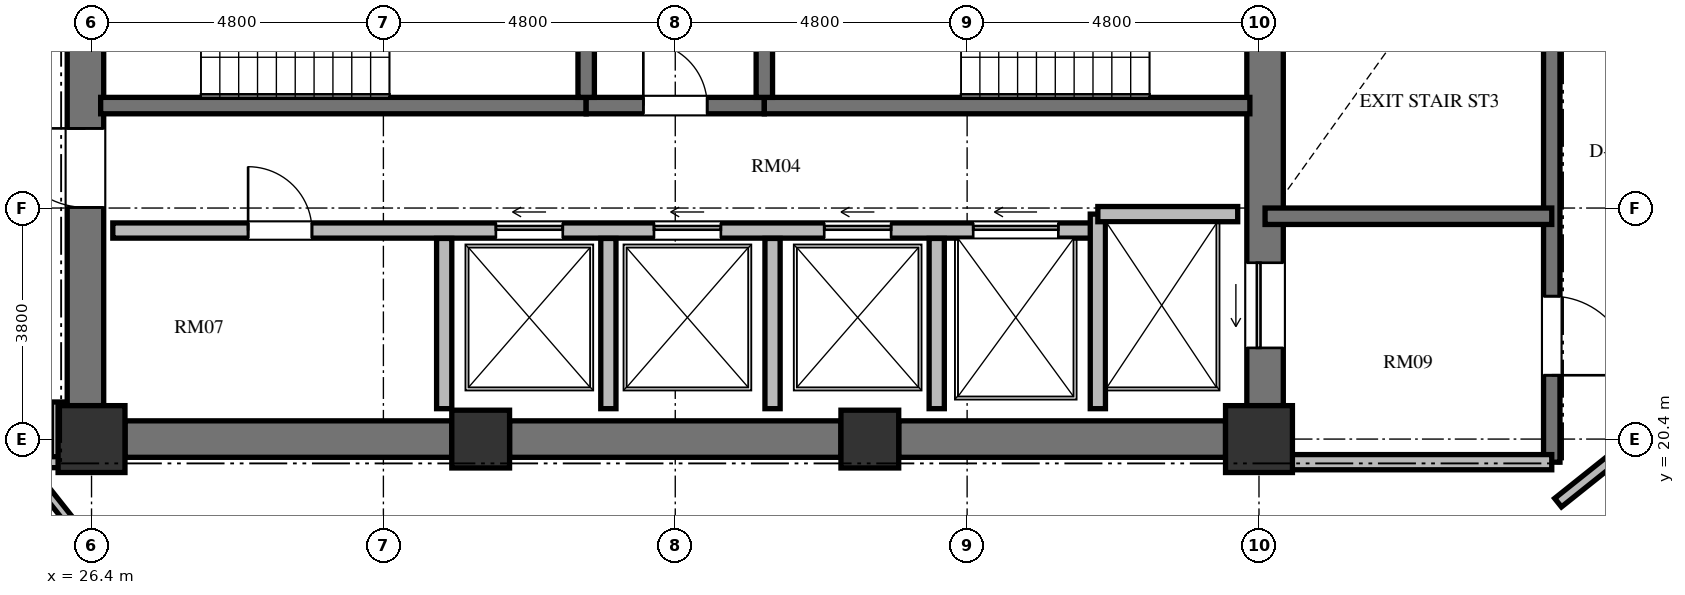
"""IFC4 building model, lengths in metres.
Left out: names, types, materials, properties, quantities, classifications, styles, units other than length and angle.
Written with IfcOpenShell. Run it as: python <this file> out.ifc"""

import sys

from ifc_helpers import new_model, si_unit, direction, frame, frame_2d, origin, origin_2d, place, context, subcontext, project, spatial, rectangle, extrude, element, fill, save


model = new_model("IFC4")
c1 = context("Model", 3, precision=1e-05, world=origin(), true_north=direction((0.0, 1.0)))
c2 = subcontext(c1, "Body", "Model", "MODEL_VIEW")
j1 = project(units=[si_unit("LENGTHUNIT", "METRE"), si_unit("PLANEANGLEUNIT", "RADIAN")], contexts=[c1])
p1 = place(None, origin())
s1 = spatial("IfcSite", under=j1, at=p1, CompositionType="ELEMENT")
p2 = place(p1, origin())
s2 = spatial("IfcBuilding", under=s1, at=p2, CompositionType="ELEMENT")
p3 = place(p2, frame((0.0, 0.0, 152.88)))
s3 = spatial("IfcBuildingStorey", under=s2, at=p3, CompositionType="ELEMENT", Elevation=152.88)
p4 = place(p3, frame((26.4, 20.4, 0.0), z_axis=(0.0, 0.0, 1.0), x_axis=(1.0, 0.0, 0.0)))
e1 = element("IfcColumn", 1, at=p4, inside=s3, PredefinedType="COLUMN", context=c2, shape_type="SweptSolid", body=[
    extrude(rectangle(XDim=1.1, YDim=1.1, at=origin_2d()), origin(), (0.0, 0.0, 1.0), 3.648),
])
for number, where, z_axis, x_axis in (
    (2, (32.8, 20.4, 0.0), (0.0, 0.0, 1.0), (1.0, 0.0, 0.0)),
    (3, (39.2, 20.4, 0.0), (0.0, 0.0, 1.0), (1.0, 0.0, 0.0)),
):
    element("IfcColumn", number, at=place(p3, frame(where, z_axis=z_axis, x_axis=x_axis)), inside=s3, PredefinedType="COLUMN", context=c2, shape_type="SweptSolid", body=[
        extrude(rectangle(XDim=0.95, YDim=0.95, at=origin_2d()), origin(), (0.0, 0.0, 1.0), 3.648),
    ])
p5 = place(p3, frame((45.6, 20.4, 0.0), z_axis=(0.0, 0.0, 1.0), x_axis=(1.0, 0.0, 0.0)))
e4 = element("IfcColumn", 4, at=p5, inside=s3, PredefinedType="COLUMN", context=c2, shape_type="SweptSolid", body=[
    extrude(rectangle(XDim=1.1, YDim=1.1, at=origin_2d()), origin(), (0.0, 0.0, 1.0), 3.648),
])
p6 = place(p3, frame((26.3, 20.95, 0.0), z_axis=(0.0, 0.0, 1.0), x_axis=(0.0, 1.0, 0.0)))
e5 = element("IfcWall", 5, at=p6, inside=s3, PredefinedType="SHEAR", context=c2, shape_type="SweptSolid", body=[
    extrude(rectangle(XDim=14.1, YDim=0.6, at=frame_2d((7.05, 0.0))), origin(), (0.0, 0.0, 1.0), 3.648),
])
p7 = place(p6, frame((6.5, 0.0, 0.0)))
e6 = element("IfcOpeningElement", 6, at=p7, cuts=e5, PredefinedType="OPENING", context=c2, shape_type="SweptSolid", body=[
    extrude(rectangle(XDim=1.2, YDim=2.15, at=frame_2d((0.6, 1.075))), frame((0.0, 0.31, 0.0), z_axis=(0.0, -1.0, 0.0), x_axis=(1.0, 0.0, 0.0)), (0.0, 0.0, 1.0), 0.62),
])
p8 = place(p6, frame((9.6, 0.0, 0.0)))
e7 = element("IfcOpeningElement", 7, at=p8, cuts=e5, PredefinedType="OPENING", context=c2, shape_type="SweptSolid", body=[
    extrude(rectangle(XDim=1.3, YDim=2.2, at=frame_2d((0.65, 1.1))), frame((0.0, 0.31, 0.0), z_axis=(0.0, -1.0, 0.0), x_axis=(1.0, 0.0, 0.0)), (0.0, 0.0, 1.0), 0.62),
])
p9 = place(p6, frame((3.26, 0.0, 0.0)))
e8 = element("IfcOpeningElement", 8, at=p9, cuts=e5, PredefinedType="OPENING", context=c2, shape_type="SweptSolid", body=[
    extrude(rectangle(XDim=1.3, YDim=2.2, at=frame_2d((0.65, 1.1))), frame((0.0, 0.31, 0.0), z_axis=(0.0, -1.0, 0.0), x_axis=(1.0, 0.0, 0.0)), (0.0, 0.0, 1.0), 0.62),
])
p10 = place(p3, frame((45.7, 20.95, 0.0), z_axis=(0.0, 0.0, 1.0), x_axis=(0.0, 1.0, 0.0)))
e9 = element("IfcWall", 9, at=p10, inside=s3, PredefinedType="SHEAR", context=c2, shape_type="SweptSolid", body=[
    extrude(rectangle(XDim=14.1, YDim=0.6, at=frame_2d((7.05, 0.0))), origin(), (0.0, 0.0, 1.0), 3.648),
])
p11 = place(p10, frame((11.75, 0.0, 0.0)))
e10 = element("IfcOpeningElement", 10, at=p11, cuts=e9, PredefinedType="OPENING", context=c2, shape_type="SweptSolid", body=[
    extrude(rectangle(XDim=1.4, YDim=2.3, at=frame_2d((0.7, 1.15))), frame((0.0, 0.31, 0.0), z_axis=(0.0, -1.0, 0.0), x_axis=(1.0, 0.0, 0.0)), (0.0, 0.0, 1.0), 0.62),
])
p12 = place(p10, frame((0.95, 0.0, 0.0)))
e11 = element("IfcOpeningElement", 11, at=p12, cuts=e9, PredefinedType="OPENING", context=c2, shape_type="SweptSolid", body=[
    extrude(rectangle(XDim=1.4, YDim=2.3, at=frame_2d((0.7, 1.15))), frame((0.0, 0.31, 0.0), z_axis=(0.0, -1.0, 0.0), x_axis=(1.0, 0.0, 0.0)), (0.0, 0.0, 1.0), 0.62),
])
p13 = place(p3, frame((26.95, 20.4, 0.0), z_axis=(0.0, 0.0, 1.0), x_axis=(1.0, 0.0, 0.0)))
e12 = element("IfcWall", 12, at=p13, inside=s3, PredefinedType="SHEAR", context=c2, shape_type="SweptSolid", body=[
    extrude(rectangle(XDim=5.375, YDim=0.6, at=frame_2d((2.688, 0.0))), origin(), (0.0, 0.0, 1.0), 3.648),
])
p14 = place(p3, frame((33.275, 20.4, 0.0), z_axis=(0.0, 0.0, 1.0), x_axis=(1.0, 0.0, 0.0)))
e13 = element("IfcWall", 13, at=p14, inside=s3, PredefinedType="SHEAR", context=c2, shape_type="SweptSolid", body=[
    extrude(rectangle(XDim=5.45, YDim=0.6, at=frame_2d((2.725, 0.0))), origin(), (0.0, 0.0, 1.0), 3.648),
])
p15 = place(p3, frame((39.675, 20.4, 0.0), z_axis=(0.0, 0.0, 1.0), x_axis=(1.0, 0.0, 0.0)))
e14 = element("IfcWall", 14, at=p15, inside=s3, PredefinedType="SHEAR", context=c2, shape_type="SweptSolid", body=[
    extrude(rectangle(XDim=5.375, YDim=0.6, at=frame_2d((2.688, 0.0))), origin(), (0.0, 0.0, 1.0), 3.648),
])
p16 = place(p3, frame((26.55, 25.885, 0.0), z_axis=(0.0, 0.0, 1.0), x_axis=(1.0, 0.0, 0.0)))
e15 = element("IfcWall", 15, at=p16, inside=s3, PredefinedType="SHEAR", context=c2, shape_type="SweptSolid", body=[
    extrude(rectangle(XDim=7.985, YDim=0.27, at=frame_2d((3.992, 0.0))), origin(), (0.0, 0.0, 1.0), 3.648),
])
p17 = place(p3, frame((34.535, 25.885, 0.0), z_axis=(0.0, 0.0, 1.0), x_axis=(1.0, 0.0, 0.0)))
e16 = element("IfcWall", 16, at=p17, inside=s3, PredefinedType="SHEAR", context=c2, shape_type="SweptSolid", body=[
    extrude(rectangle(XDim=2.93, YDim=0.27, at=frame_2d((1.465, 0.0))), origin(), (0.0, 0.0, 1.0), 3.648),
])
p18 = place(p17, frame((0.94, 0.0, 0.0)))
e17 = element("IfcOpeningElement", 17, at=p18, cuts=e16, PredefinedType="OPENING", context=c2, shape_type="SweptSolid", body=[
    extrude(rectangle(XDim=1.05, YDim=2.15, at=frame_2d((0.525, 1.075))), frame((0.0, 0.145, 0.0), z_axis=(0.0, -1.0, 0.0), x_axis=(1.0, 0.0, 0.0)), (0.0, 0.0, 1.0), 0.29),
])
p19 = place(p3, frame((37.465, 25.885, 0.0), z_axis=(0.0, 0.0, 1.0), x_axis=(1.0, 0.0, 0.0)))
e18 = element("IfcWall", 18, at=p19, inside=s3, PredefinedType="SHEAR", context=c2, shape_type="SweptSolid", body=[
    extrude(rectangle(XDim=7.985, YDim=0.27, at=frame_2d((3.992, 0.0))), origin(), (0.0, 0.0, 1.0), 3.648),
])
for number, where, z_axis, x_axis in (
    (19, (34.535, 26.02, 0.0), (0.0, 0.0, 1.0), (0.0, 1.0, 0.0)),
    (20, (37.465, 26.02, 0.0), (0.0, 0.0, 1.0), (0.0, 1.0, 0.0)),
):
    element("IfcWall", number, at=place(p3, frame(where, z_axis=z_axis, x_axis=x_axis)), inside=s3, PredefinedType="SHEAR", context=c2, shape_type="SweptSolid", body=[
        extrude(rectangle(XDim=4.08, YDim=0.27, at=frame_2d((2.04, 0.0))), origin(), (0.0, 0.0, 1.0), 3.648),
    ])
p20 = place(p3, frame((26.75, 23.83, 0.0), z_axis=(0.0, 0.0, 1.0), x_axis=(1.0, 0.0, 0.0)))
e21 = element("IfcWall", 21, at=p20, inside=s3, PredefinedType="SOLIDWALL", context=c2, shape_type="SweptSolid", body=[
    extrude(rectangle(XDim=16.2, YDim=0.25, at=frame_2d((8.1, 0.0))), origin(), (0.0, 0.0, 1.0), 3.428),
])
p21 = place(p20, frame((2.225, 0.0, 0.0)))
e22 = element("IfcOpeningElement", 22, at=p21, cuts=e21, PredefinedType="OPENING", context=c2, shape_type="SweptSolid", body=[
    extrude(rectangle(XDim=1.05, YDim=2.15, at=frame_2d((0.525, 1.075))), frame((0.0, 0.135, 0.0), z_axis=(0.0, -1.0, 0.0), x_axis=(1.0, 0.0, 0.0)), (0.0, 0.0, 1.0), 0.27),
])
p22 = place(p20, frame((6.3, 0.0, 0.0)))
e23 = element("IfcOpeningElement", 23, at=p22, cuts=e21, PredefinedType="OPENING", context=c2, shape_type="SweptSolid", body=[
    extrude(rectangle(XDim=1.1, YDim=2.2, at=frame_2d((0.55, 1.1))), frame((0.0, 0.135, 0.0), z_axis=(0.0, -1.0, 0.0), x_axis=(1.0, 0.0, 0.0)), (0.0, 0.0, 1.0), 0.27),
])
p23 = place(p20, frame((8.9, 0.0, 0.0)))
e24 = element("IfcOpeningElement", 24, at=p23, cuts=e21, PredefinedType="OPENING", context=c2, shape_type="SweptSolid", body=[
    extrude(rectangle(XDim=1.1, YDim=2.2, at=frame_2d((0.55, 1.1))), frame((0.0, 0.135, 0.0), z_axis=(0.0, -1.0, 0.0), x_axis=(1.0, 0.0, 0.0)), (0.0, 0.0, 1.0), 0.27),
])
p24 = place(p20, frame((11.7, 0.0, 0.0)))
e25 = element("IfcOpeningElement", 25, at=p24, cuts=e21, PredefinedType="OPENING", context=c2, shape_type="SweptSolid", body=[
    extrude(rectangle(XDim=1.1, YDim=2.2, at=frame_2d((0.55, 1.1))), frame((0.0, 0.135, 0.0), z_axis=(0.0, -1.0, 0.0), x_axis=(1.0, 0.0, 0.0)), (0.0, 0.0, 1.0), 0.27),
])
p25 = place(p20, frame((14.15, 0.0, 0.0)))
e26 = element("IfcOpeningElement", 26, at=p25, cuts=e21, PredefinedType="OPENING", context=c2, shape_type="SweptSolid", body=[
    extrude(rectangle(XDim=1.4, YDim=2.3, at=frame_2d((0.7, 1.15))), frame((0.0, 0.135, 0.0), z_axis=(0.0, -1.0, 0.0), x_axis=(1.0, 0.0, 0.0)), (0.0, 0.0, 1.0), 0.27),
])
p26 = place(p3, frame((42.95, 20.9, 0.0), z_axis=(0.0, 0.0, 1.0), x_axis=(0.0, 1.0, 0.0)))
e27 = element("IfcWall", 27, at=p26, inside=s3, PredefinedType="SOLIDWALL", context=c2, shape_type="SweptSolid", body=[
    extrude(rectangle(XDim=3.2, YDim=0.25, at=frame_2d((1.6, 0.0))), origin(), (0.0, 0.0, 1.0), 3.428),
])
p27 = place(p3, frame((42.95, 24.1, 0.0), z_axis=(0.0, 0.0, 1.0), x_axis=(1.0, 0.0, 0.0)))
e28 = element("IfcWall", 28, at=p27, inside=s3, PredefinedType="SOLIDWALL", context=c2, shape_type="SweptSolid", body=[
    extrude(rectangle(XDim=2.3, YDim=0.25, at=frame_2d((1.15, 0.0))), origin(), (0.0, 0.0, 1.0), 3.428),
])
for number, where, z_axis, x_axis in (
    (29, (32.2, 20.9, 0.0), (0.0, 0.0, 1.0), (0.0, 1.0, 0.0)),
    (30, (34.9, 20.9, 0.0), (0.0, 0.0, 1.0), (0.0, 1.0, 0.0)),
    (31, (37.6, 20.9, 0.0), (0.0, 0.0, 1.0), (0.0, 1.0, 0.0)),
    (32, (40.3, 20.9, 0.0), (0.0, 0.0, 1.0), (0.0, 1.0, 0.0)),
):
    element("IfcWall", number, at=place(p3, frame(where, z_axis=z_axis, x_axis=x_axis)), inside=s3, PredefinedType="SOLIDWALL", context=c2, shape_type="SweptSolid", body=[
        extrude(rectangle(XDim=2.8, YDim=0.25, at=frame_2d((1.4, 0.0))), origin(), (0.0, 0.0, 1.0), 3.428),
    ])
p28 = place(p3, frame((50.415, 35.845, 0.0), z_axis=(0.0, 0.0, 1.0), x_axis=(0.0, -1.0, 0.0)))
e33 = element("IfcWall", 33, at=p28, inside=s3, PredefinedType="SHEAR", context=c2, shape_type="SweptSolid", body=[
    extrude(rectangle(XDim=15.825, YDim=0.27, at=frame_2d((7.913, 0.0))), origin(), (0.0, 0.0, 1.0), 3.648),
])
p29 = place(p28, frame((4.445, 0.0, 0.0)))
e34 = element("IfcOpeningElement", 34, at=p29, cuts=e33, PredefinedType="OPENING", context=c2, shape_type="SweptSolid", body=[
    extrude(rectangle(XDim=1.2, YDim=2.15, at=frame_2d((0.6, 1.075))), frame((0.0, 0.145, 0.0), z_axis=(0.0, -1.0, 0.0), x_axis=(1.0, 0.0, 0.0)), (0.0, 0.0, 1.0), 0.29),
])
p30 = place(p28, frame((1.295, 0.0, 0.0)))
e35 = element("IfcOpeningElement", 35, at=p30, cuts=e33, PredefinedType="OPENING", context=c2, shape_type="SweptSolid", body=[
    extrude(rectangle(XDim=1.3, YDim=2.2, at=frame_2d((0.65, 1.1))), frame((0.0, 0.145, 0.0), z_axis=(0.0, -1.0, 0.0), x_axis=(1.0, 0.0, 0.0)), (0.0, 0.0, 1.0), 0.29),
])
p31 = place(p28, frame((13.095, 0.0, 0.0)))
e36 = element("IfcOpeningElement", 36, at=p31, cuts=e33, PredefinedType="OPENING", context=c2, shape_type="SweptSolid", body=[
    extrude(rectangle(XDim=1.3, YDim=2.2, at=frame_2d((0.65, 1.1))), frame((0.0, 0.145, 0.0), z_axis=(0.0, -1.0, 0.0), x_axis=(1.0, 0.0, 0.0)), (0.0, 0.0, 1.0), 0.29),
])
p32 = place(p3, frame((45.7, 24.065, 0.0), z_axis=(0.0, 0.0, 1.0), x_axis=(1.0, 0.0, 0.0)))
e37 = element("IfcWall", 37, at=p32, inside=s3, PredefinedType="SHEAR", context=c2, shape_type="SweptSolid", body=[
    extrude(rectangle(XDim=4.715, YDim=0.27, at=frame_2d((2.357, 0.0))), origin(), (0.0, 0.0, 1.0), 3.648),
])
p33 = place(p3, frame((45.7, 20.02, 0.0), z_axis=(0.0, 0.0, 1.0), x_axis=(1.0, 0.0, 0.0)))
e38 = element("IfcWall", 38, at=p33, inside=s3, PredefinedType="SOLIDWALL", context=c2, shape_type="SweptSolid", body=[
    extrude(rectangle(XDim=4.715, YDim=0.25, at=frame_2d((2.357, 0.0))), origin(), (0.0, 0.0, 1.0), 3.428),
])
p34 = place(p3, frame((53.181, 21.481, 0.0), z_axis=(0.0, 0.0, 1.0), x_axis=(-0.781420737726, -0.624004511724, 0.0)))
e39 = element("IfcWall", 39, at=p34, inside=s3, PredefinedType="PARTITIONING", context=c2, shape_type="SweptSolid", body=[
    extrude(rectangle(XDim=3.407, YDim=0.18, at=frame_2d((1.704, 0.0))), origin(), (0.0, 0.0, 1.0), 3.428),
])
p35 = place(p3, frame((25.83, 21.01, 0.0), z_axis=(0.0, 0.0, 1.0), x_axis=(0.0, -1.0, 0.0)))
e40 = element("IfcWall", 40, at=p35, inside=s3, PredefinedType="PARTITIONING", context=c2, shape_type="SweptSolid", body=[
    extrude(rectangle(XDim=1.03, YDim=0.18, at=frame_2d((0.515, 0.0))), origin(), (0.0, 0.0, 1.0), 3.428),
])
p36 = place(p3, frame((25.87, 20.02, 0.0), z_axis=(0.0, 0.0, 1.0), x_axis=(-1.0, 0.0, 0.0)))
e41 = element("IfcWall", 41, at=p36, inside=s3, PredefinedType="PARTITIONING", context=c2, shape_type="SweptSolid", body=[
    extrude(rectangle(XDim=2.56, YDim=0.18, at=frame_2d((1.28, 0.0))), origin(), (0.0, 0.0, 1.0), 3.428),
])
p37 = place(p36, frame((0.858, 0.0, 0.0)))
e42 = element("IfcOpeningElement", 42, at=p37, cuts=e41, PredefinedType="OPENING", context=c2, shape_type="SweptSolid", body=[
    extrude(rectangle(XDim=1.05, YDim=2.15, at=frame_2d((0.525, 1.075))), frame((0.0, 0.1, 0.0), z_axis=(0.0, -1.0, 0.0), x_axis=(1.0, 0.0, 0.0)), (0.0, 0.0, 1.0), 0.2),
])
p38 = place(p3, frame((25.372, 19.898, 0.0), z_axis=(0.0, 0.0, 1.0), x_axis=(0.620699148788, -0.784048829279, 0.0)))
e43 = element("IfcWall", 43, at=p38, inside=s3, PredefinedType="PARTITIONING", context=c2, shape_type="SweptSolid", body=[
    extrude(rectangle(XDim=14.828, YDim=0.15, at=frame_2d((7.414, 0.0))), origin(), (0.0, 0.0, 1.0), 3.428),
])
p39 = place(p18, origin())
e44 = element("IfcDoor", 44, at=p39, inside=s3, OperationType="SINGLE_SWING_LEFT", PredefinedType="DOOR", context=c2, shape_type="SweptSolid", body=[
    extrude(rectangle(XDim=1.05, YDim=2.15, at=frame_2d((0.525, 1.075))), frame((0.0, 0.025, 0.0), z_axis=(0.0, -1.0, 0.0), x_axis=(1.0, 0.0, 0.0)), (0.0, 0.0, 1.0), 0.05),
])
fill(e17, e44)
p40 = place(p9, origin())
e45 = element("IfcDoor", 45, at=p40, inside=s3, OperationType="SINGLE_SWING_RIGHT", PredefinedType="DOOR", context=c2, shape_type="SweptSolid", body=[
    extrude(rectangle(XDim=1.3, YDim=2.2, at=frame_2d((0.65, 1.1))), frame((0.0, 0.025, 0.0), z_axis=(0.0, -1.0, 0.0), x_axis=(1.0, 0.0, 0.0)), (0.0, 0.0, 1.0), 0.05),
])
fill(e8, e45)
p41 = place(p21, origin())
e46 = element("IfcDoor", 46, at=p41, inside=s3, OperationType="SINGLE_SWING_LEFT", PredefinedType="DOOR", context=c2, shape_type="SweptSolid", body=[
    extrude(rectangle(XDim=1.05, YDim=2.15, at=frame_2d((0.525, 1.075))), frame((0.0, 0.025, 0.0), z_axis=(0.0, -1.0, 0.0), x_axis=(1.0, 0.0, 0.0)), (0.0, 0.0, 1.0), 0.05),
])
fill(e22, e46)
p42 = place(p22, origin())
e47 = element("IfcDoor", 47, at=p42, inside=s3, OperationType="SLIDING_TO_LEFT", PredefinedType="DOOR", context=c2, shape_type="SweptSolid", body=[
    extrude(rectangle(XDim=1.1, YDim=2.2, at=frame_2d((0.55, 1.1))), frame((0.0, 0.025, 0.0), z_axis=(0.0, -1.0, 0.0), x_axis=(1.0, 0.0, 0.0)), (0.0, 0.0, 1.0), 0.05),
])
fill(e23, e47)
p43 = place(p23, origin())
e48 = element("IfcDoor", 48, at=p43, inside=s3, OperationType="SLIDING_TO_LEFT", PredefinedType="DOOR", context=c2, shape_type="SweptSolid", body=[
    extrude(rectangle(XDim=1.1, YDim=2.2, at=frame_2d((0.55, 1.1))), frame((0.0, 0.025, 0.0), z_axis=(0.0, -1.0, 0.0), x_axis=(1.0, 0.0, 0.0)), (0.0, 0.0, 1.0), 0.05),
])
fill(e24, e48)
p44 = place(p24, origin())
e49 = element("IfcDoor", 49, at=p44, inside=s3, OperationType="SLIDING_TO_LEFT", PredefinedType="DOOR", context=c2, shape_type="SweptSolid", body=[
    extrude(rectangle(XDim=1.1, YDim=2.2, at=frame_2d((0.55, 1.1))), frame((0.0, 0.025, 0.0), z_axis=(0.0, -1.0, 0.0), x_axis=(1.0, 0.0, 0.0)), (0.0, 0.0, 1.0), 0.05),
])
fill(e25, e49)
p45 = place(p12, origin())
e50 = element("IfcDoor", 50, at=p45, inside=s3, OperationType="SLIDING_TO_LEFT", PredefinedType="DOOR", context=c2, shape_type="SweptSolid", body=[
    extrude(rectangle(XDim=1.4, YDim=2.3, at=frame_2d((0.7, 1.15))), frame((0.0, 0.025, 0.0), z_axis=(0.0, -1.0, 0.0), x_axis=(1.0, 0.0, 0.0)), (0.0, 0.0, 1.0), 0.05),
])
fill(e11, e50)
p46 = place(p25, origin())
e51 = element("IfcDoor", 51, at=p46, inside=s3, OperationType="SLIDING_TO_LEFT", PredefinedType="DOOR", context=c2, shape_type="SweptSolid", body=[
    extrude(rectangle(XDim=1.4, YDim=2.3, at=frame_2d((0.7, 1.15))), frame((0.0, 0.025, 0.0), z_axis=(0.0, -1.0, 0.0), x_axis=(1.0, 0.0, 0.0)), (0.0, 0.0, 1.0), 0.05),
])
fill(e26, e51)
p47 = place(p31, origin())
e52 = element("IfcDoor", 52, at=p47, inside=s3, OperationType="SINGLE_SWING_RIGHT", PredefinedType="DOOR", context=c2, shape_type="SweptSolid", body=[
    extrude(rectangle(XDim=1.3, YDim=2.2, at=frame_2d((0.65, 1.1))), frame((0.0, 0.025, 0.0), z_axis=(0.0, -1.0, 0.0), x_axis=(1.0, 0.0, 0.0)), (0.0, 0.0, 1.0), 0.05),
])
fill(e36, e52)
save(model, sys.argv[1])
